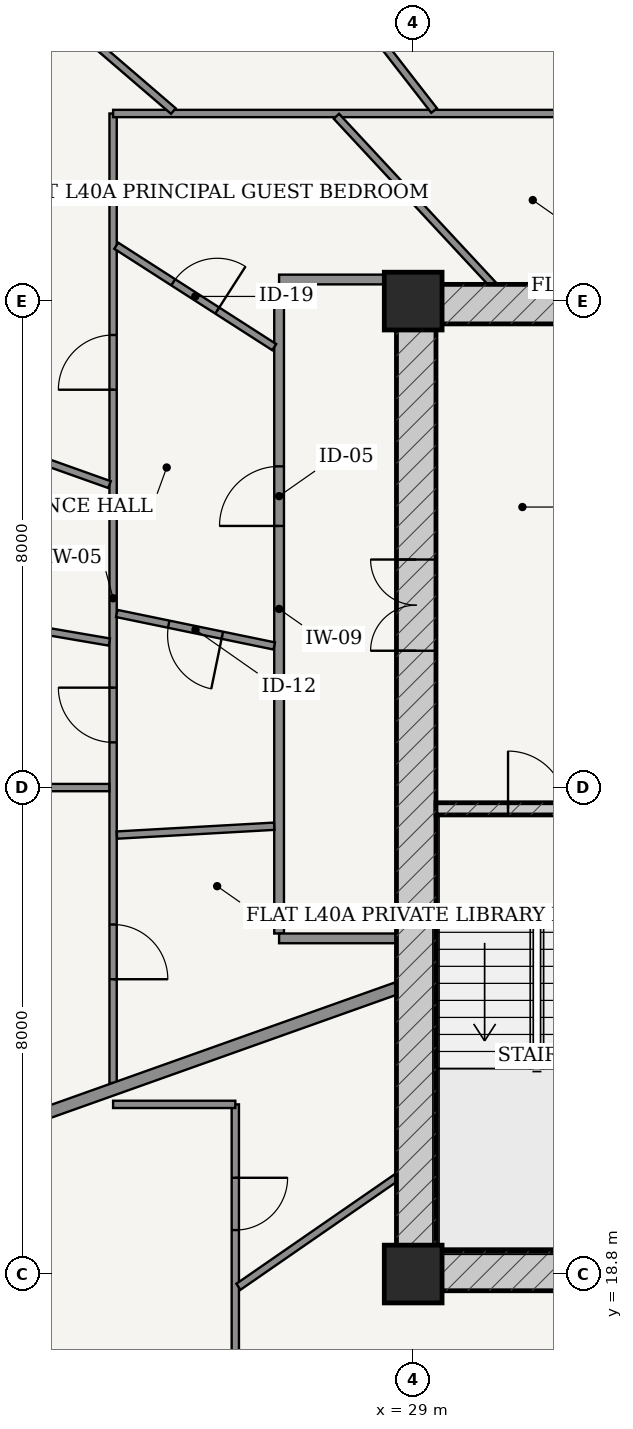
"""IFC4 building model, lengths in metres.
Left out: names, types, materials, properties, quantities, classifications, styles, units other than length and angle.
Written with IfcOpenShell. Run it as: python <this file> out.ifc"""

import sys

from ifc_helpers import new_model, si_unit, direction, frame, frame_2d, origin, origin_2d, place, context, subcontext, project, spatial, rectangle, extrude, source, transform, mapped, element, fill, save


model = new_model("IFC4")
c1 = context("Model", 3, precision=1e-05, world=origin(), true_north=direction((-0.2419218956, 0.970295726276)))
c2 = subcontext(c1, "Body", "Model", "MODEL_VIEW")
j1 = project(units=[si_unit("LENGTHUNIT", "METRE"), si_unit("PLANEANGLEUNIT", "RADIAN")], contexts=[c1])
p1 = place(None, origin())
s1 = spatial("IfcSite", under=j1, at=p1, CompositionType="ELEMENT")
p2 = place(p1, origin())
s2 = spatial("IfcBuilding", under=s1, at=p2, CompositionType="ELEMENT")
p3 = place(p2, frame((0.0, 0.0, 153.4)))
s3 = spatial("IfcBuildingStorey", under=s2, at=p3, CompositionType="ELEMENT", Elevation=153.4)
for number, where, z_axis, x_axis in (
    (1, (29.0, 18.8, 0.0), (0.0, 0.0, 1.0), (1.0, 0.0, 0.0)),
    (2, (29.0, 34.8, 0.0), (0.0, 0.0, 1.0), (1.0, 0.0, 0.0)),
):
    element("IfcColumn", number, at=place(p3, frame(where, z_axis=z_axis, x_axis=x_axis)), inside=s3, PredefinedType="COLUMN", context=c2, shape_type="SweptSolid", body=[
        extrude(rectangle(XDim=0.95, YDim=0.95, at=origin_2d()), origin(), (0.0, 0.0, 1.0), 3.6),
    ])
p4 = place(p3, frame((28.725, 18.85, 0.0), z_axis=(0.0, 0.0, 1.0), x_axis=(1.0, 0.0, 0.0)))
e3 = element("IfcWall", 3, at=p4, inside=s3, PredefinedType="SHEAR", context=c2, shape_type="SweptSolid", body=[
    extrude(rectangle(XDim=18.55, YDim=0.65, at=frame_2d((9.275, 0.0))), origin(), (0.0, 0.0, 1.0), 3.33),
])
p5 = place(p4, frame((7.51, 0.0, 0.0)))
e4 = element("IfcOpeningElement", 4, at=p5, cuts=e3, PredefinedType="OPENING", context=c2, shape_type="SweptSolid", body=[
    extrude(rectangle(XDim=0.85, YDim=2.1, at=frame_2d((0.425, 1.05))), frame((0.0, 0.335, 0.0), z_axis=(0.0, -1.0, 0.0), x_axis=(1.0, 0.0, 0.0)), (0.0, 0.0, 1.0), 0.67),
])
p6 = place(p4, frame((10.59, 0.0, 0.0)))
e5 = element("IfcOpeningElement", 5, at=p6, cuts=e3, PredefinedType="OPENING", context=c2, shape_type="SweptSolid", body=[
    extrude(rectangle(XDim=0.85, YDim=2.1, at=frame_2d((0.425, 1.05))), frame((0.0, 0.335, 0.0), z_axis=(0.0, -1.0, 0.0), x_axis=(1.0, 0.0, 0.0)), (0.0, 0.0, 1.0), 0.67),
])
p7 = place(p3, frame((28.725, 34.75, 0.0), z_axis=(0.0, 0.0, 1.0), x_axis=(1.0, 0.0, 0.0)))
e6 = element("IfcWall", 6, at=p7, inside=s3, PredefinedType="SHEAR", context=c2, shape_type="SweptSolid", body=[
    extrude(rectangle(XDim=18.55, YDim=0.65, at=frame_2d((9.275, 0.0))), origin(), (0.0, 0.0, 1.0), 3.33),
])
p8 = place(p3, frame((29.05, 19.175, 0.0), z_axis=(0.0, 0.0, 1.0), x_axis=(0.0, 1.0, 0.0)))
e7 = element("IfcWall", 7, at=p8, inside=s3, PredefinedType="SHEAR", context=c2, shape_type="SweptSolid", body=[
    extrude(rectangle(XDim=15.25, YDim=0.65, at=frame_2d((7.625, 0.0))), origin(), (0.0, 0.0, 1.0), 3.33),
])
p9 = place(p8, frame((9.875, 0.0, 0.0)))
e8 = element("IfcOpeningElement", 8, at=p9, cuts=e7, PredefinedType="OPENING", context=c2, shape_type="SweptSolid", body=[
    extrude(rectangle(XDim=1.5, YDim=2.2, at=frame_2d((0.75, 1.1))), frame((0.0, 0.335, 0.0), z_axis=(0.0, -1.0, 0.0), x_axis=(1.0, 0.0, 0.0)), (0.0, 0.0, 1.0), 0.67),
])
p10 = place(p3, frame((29.375, 26.45, 0.0), z_axis=(0.0, 0.0, 1.0), x_axis=(1.0, 0.0, 0.0)))
e9 = element("IfcWall", 9, at=p10, inside=s3, PredefinedType="SOLIDWALL", context=c2, shape_type="SweptSolid", body=[
    extrude(rectangle(XDim=3.32, YDim=0.2, at=frame_2d((1.66, 0.0))), origin(), (0.0, 0.0, 1.0), 3.33),
])
p11 = place(p10, frame((1.185, 0.0, 0.0)))
e10 = element("IfcOpeningElement", 10, at=p11, cuts=e9, PredefinedType="OPENING", context=c2, shape_type="SweptSolid", body=[
    extrude(rectangle(XDim=0.95, YDim=2.15, at=frame_2d((0.475, 1.075))), frame((0.0, 0.11, 0.0), z_axis=(0.0, -1.0, 0.0), x_axis=(1.0, 0.0, 0.0)), (0.0, 0.0, 1.0), 0.22),
])
p12 = place(p3, frame((26.795, 24.4, 0.0), z_axis=(0.0, 0.0, 1.0), x_axis=(0.0, 1.0, 0.0)))
e11 = element("IfcWall", 11, at=p12, inside=s3, PredefinedType="PARTITIONING", context=c2, shape_type="SweptSolid", body=[
    extrude(rectangle(XDim=10.675, YDim=0.16, at=frame_2d((5.337, 0.0))), origin(), (0.0, 0.0, 1.0), 2.776),
])
p13 = place(p12, frame((6.702, 0.0, 0.0)))
e12 = element("IfcOpeningElement", 12, at=p13, cuts=e11, PredefinedType="OPENING", context=c2, shape_type="SweptSolid", body=[
    extrude(rectangle(XDim=0.98, YDim=2.2, at=frame_2d((0.49, 1.1))), frame((0.0, 0.09, 0.0), z_axis=(0.0, -1.0, 0.0), x_axis=(1.0, 0.0, 0.0)), (0.0, 0.0, 1.0), 0.18),
])
p14 = place(p3, frame((26.795, 35.155, 0.0), z_axis=(0.0, 0.0, 1.0), x_axis=(1.0, 0.0, 0.0)))
e13 = element("IfcWall", 13, at=p14, inside=s3, PredefinedType="PARTITIONING", context=c2, shape_type="SweptSolid", body=[
    extrude(rectangle(XDim=1.93, YDim=0.16, at=frame_2d((0.965, 0.0))), origin(), (0.0, 0.0, 1.0), 2.776),
])
p15 = place(p3, frame((26.795, 24.32, 0.0), z_axis=(0.0, 0.0, 1.0), x_axis=(1.0, 0.0, 0.0)))
e14 = element("IfcWall", 14, at=p15, inside=s3, PredefinedType="PARTITIONING", context=c2, shape_type="SweptSolid", body=[
    extrude(rectangle(XDim=1.93, YDim=0.16, at=frame_2d((0.965, 0.0))), origin(), (0.0, 0.0, 1.0), 3.33),
])
p16 = place(p3, frame((24.065, 21.941, 0.0), z_axis=(0.0, 0.0, 1.0), x_axis=(0.0, 1.0, 0.0)))
e15 = element("IfcWall", 15, at=p16, inside=s3, PredefinedType="PARTITIONING", context=c2, shape_type="SweptSolid", body=[
    extrude(rectangle(XDim=15.944, YDim=0.12, at=frame_2d((7.972, 0.0))), origin(), (0.0, 0.0, 1.0), 2.776),
])
p17 = place(p16, frame((5.602, 0.0, 0.0)))
e16 = element("IfcOpeningElement", 16, at=p17, cuts=e15, PredefinedType="OPENING", context=c2, shape_type="SweptSolid", body=[
    extrude(rectangle(XDim=0.9, YDim=2.15, at=frame_2d((0.45, 1.075))), frame((0.0, 0.07, 0.0), z_axis=(0.0, -1.0, 0.0), x_axis=(1.0, 0.0, 0.0)), (0.0, 0.0, 1.0), 0.14),
])
p18 = place(p16, frame((1.707, 0.0, 0.0)))
e17 = element("IfcOpeningElement", 17, at=p18, cuts=e15, PredefinedType="OPENING", context=c2, shape_type="SweptSolid", body=[
    extrude(rectangle(XDim=0.9, YDim=2.15, at=frame_2d((0.45, 1.075))), frame((0.0, 0.07, 0.0), z_axis=(0.0, -1.0, 0.0), x_axis=(1.0, 0.0, 0.0)), (0.0, 0.0, 1.0), 0.14),
])
p19 = place(p16, frame((11.402, 0.0, 0.0)))
e18 = element("IfcOpeningElement", 18, at=p19, cuts=e15, PredefinedType="OPENING", context=c2, shape_type="SweptSolid", body=[
    extrude(rectangle(XDim=0.9, YDim=2.15, at=frame_2d((0.45, 1.075))), frame((0.0, 0.07, 0.0), z_axis=(0.0, -1.0, 0.0), x_axis=(1.0, 0.0, 0.0)), (0.0, 0.0, 1.0), 0.14),
])
p20 = place(p3, frame((24.065, 37.885, 0.0), z_axis=(0.0, 0.0, 1.0), x_axis=(1.0, 0.0, 0.0)))
e19 = element("IfcWall", 19, at=p20, inside=s3, PredefinedType="PARTITIONING", context=c2, shape_type="SweptSolid", body=[
    extrude(rectangle(XDim=7.47, YDim=0.12, at=frame_2d((3.735, 0.0))), origin(), (0.0, 0.0, 1.0), 2.776),
])
p21 = place(p3, frame((29.344, 37.934, 0.0), z_axis=(0.0, 0.0, 1.0), x_axis=(-0.613758289074, 0.789493991487, 0.0)))
e20 = element("IfcWall", 20, at=p21, inside=s3, PredefinedType="PARTITIONING", context=c2, shape_type="SweptSolid", body=[
    extrude(rectangle(XDim=7.695, YDim=0.12, at=frame_2d((3.848, 0.0))), origin(), (0.0, 0.0, 1.0), 2.776),
])
p22 = place(p21, frame((2.399, 0.0, 0.0)))
e21 = element("IfcOpeningElement", 21, at=p22, cuts=e20, PredefinedType="OPENING", context=c2, shape_type="SweptSolid", body=[
    extrude(rectangle(XDim=0.9, YDim=2.15, at=frame_2d((0.45, 1.075))), frame((0.0, 0.07, 0.0), z_axis=(0.0, -1.0, 0.0), x_axis=(1.0, 0.0, 0.0)), (0.0, 0.0, 1.0), 0.14),
])
p23 = place(p3, frame((25.056, 37.925, 0.0), z_axis=(0.0, 0.0, 1.0), x_axis=(-0.758354915574, 0.65184186888, 0.0)))
e22 = element("IfcWall", 22, at=p23, inside=s3, PredefinedType="PARTITIONING", context=c2, shape_type="SweptSolid", body=[
    extrude(rectangle(XDim=5.432, YDim=0.12, at=frame_2d((2.716, 0.0))), origin(), (0.0, 0.0, 1.0), 2.846),
])
p24 = place(p23, frame((2.266, 0.0, 0.0)))
e23 = element("IfcOpeningElement", 23, at=p24, cuts=e22, PredefinedType="OPENING", context=c2, shape_type="SweptSolid", body=[
    extrude(rectangle(XDim=0.9, YDim=2.15, at=frame_2d((0.45, 1.075))), frame((0.0, 0.07, 0.0), z_axis=(0.0, -1.0, 0.0), x_axis=(1.0, 0.0, 0.0)), (0.0, 0.0, 1.0), 0.14),
])
p25 = place(p3, frame((24.007, 31.782, 0.0), z_axis=(0.0, 0.0, 1.0), x_axis=(-0.942077868165, 0.335394231187, 0.0)))
e24 = element("IfcWall", 24, at=p25, inside=s3, PredefinedType="PARTITIONING", context=c2, shape_type="SweptSolid", body=[
    extrude(rectangle(XDim=8.817, YDim=0.12, at=frame_2d((4.408, 0.0))), origin(), (0.0, 0.0, 1.0), 2.846),
])
p26 = place(p25, frame((3.958, 0.0, 0.0)))
e25 = element("IfcOpeningElement", 25, at=p26, cuts=e24, PredefinedType="OPENING", context=c2, shape_type="SweptSolid", body=[
    extrude(rectangle(XDim=0.9, YDim=2.15, at=frame_2d((0.45, 1.075))), frame((0.0, 0.07, 0.0), z_axis=(0.0, -1.0, 0.0), x_axis=(1.0, 0.0, 0.0)), (0.0, 0.0, 1.0), 0.14),
])
p27 = place(p3, frame((24.004, 29.193, 0.0), z_axis=(0.0, 0.0, 1.0), x_axis=(-0.985698378271, 0.168519159369, 0.0)))
e26 = element("IfcWall", 26, at=p27, inside=s3, PredefinedType="PARTITIONING", context=c2, shape_type="SweptSolid", body=[
    extrude(rectangle(XDim=9.769, YDim=0.12, at=frame_2d((4.884, 0.0))), origin(), (0.0, 0.0, 1.0), 2.776),
])
p28 = place(p3, frame((24.003, 26.8, 0.0), z_axis=(0.0, 0.0, 1.0), x_axis=(-1.0, 0.0, 0.0)))
e27 = element("IfcWall", 27, at=p28, inside=s3, PredefinedType="PARTITIONING", context=c2, shape_type="SweptSolid", body=[
    extrude(rectangle(XDim=10.143, YDim=0.12, at=frame_2d((5.071, 0.0))), origin(), (0.0, 0.0, 1.0), 2.846),
])
p29 = place(p28, frame((4.622, 0.0, 0.0)))
e28 = element("IfcOpeningElement", 28, at=p29, cuts=e27, PredefinedType="OPENING", context=c2, shape_type="SweptSolid", body=[
    extrude(rectangle(XDim=0.9, YDim=2.15, at=frame_2d((0.45, 1.075))), frame((0.0, 0.07, 0.0), z_axis=(0.0, -1.0, 0.0), x_axis=(1.0, 0.0, 0.0)), (0.0, 0.0, 1.0), 0.14),
])
p30 = place(p3, frame((30.307, 35.075, 0.0), z_axis=(0.0, 0.0, 1.0), x_axis=(-0.68082810609, 0.732443233267, 0.0)))
e29 = element("IfcWall", 29, at=p30, inside=s3, PredefinedType="PARTITIONING", context=c2, shape_type="SweptSolid", body=[
    extrude(rectangle(XDim=3.775, YDim=0.12, at=frame_2d((1.887, 0.0))), origin(), (0.0, 0.0, 1.0), 2.776),
])
p31 = place(p3, frame((26.715, 34.043, 0.0), z_axis=(0.0, 0.0, 1.0), x_axis=(-0.841597086151, 0.540105864235, 0.0)))
e30 = element("IfcWall", 30, at=p31, inside=s3, PredefinedType="PARTITIONING", context=c2, shape_type="SweptSolid", body=[
    extrude(rectangle(XDim=3.087, YDim=0.12, at=frame_2d((1.543, 0.0))), origin(), (0.0, 0.0, 1.0), 3.005),
])
p32 = place(p31, frame((1.113, 0.0, 0.0)))
e31 = element("IfcOpeningElement", 31, at=p32, cuts=e30, PredefinedType="OPENING", context=c2, shape_type="SweptSolid", body=[
    extrude(rectangle(XDim=0.86, YDim=2.15, at=frame_2d((0.43, 1.075))), frame((0.0, 0.07, 0.0), z_axis=(0.0, -1.0, 0.0), x_axis=(1.0, 0.0, 0.0)), (0.0, 0.0, 1.0), 0.14),
])
p33 = place(p3, frame((26.715, 29.129, 0.0), z_axis=(0.0, 0.0, 1.0), x_axis=(-0.979376501526, 0.202043728582, 0.0)))
e32 = element("IfcWall", 32, at=p33, inside=s3, PredefinedType="PARTITIONING", context=c2, shape_type="SweptSolid", body=[
    extrude(rectangle(XDim=2.644, YDim=0.12, at=frame_2d((1.322, 0.0))), origin(), (0.0, 0.0, 1.0), 3.33),
])
p34 = place(p33, frame((0.872, 0.0, 0.0)))
e33 = element("IfcOpeningElement", 33, at=p34, cuts=e32, PredefinedType="OPENING", context=c2, shape_type="SweptSolid", body=[
    extrude(rectangle(XDim=0.9, YDim=2.15, at=frame_2d((0.45, 1.075))), frame((0.0, 0.07, 0.0), z_axis=(0.0, -1.0, 0.0), x_axis=(1.0, 0.0, 0.0)), (0.0, 0.0, 1.0), 0.14),
])
p35 = place(p3, frame((26.715, 26.164, 0.0), z_axis=(0.0, 0.0, 1.0), x_axis=(-0.998418047295, -0.056226353574, 0.0)))
e34 = element("IfcWall", 34, at=p35, inside=s3, PredefinedType="PARTITIONING", context=c2, shape_type="SweptSolid", body=[
    extrude(rectangle(XDim=2.592, YDim=0.12, at=frame_2d((1.296, 0.0))), origin(), (0.0, 0.0, 1.0), 3.33),
])
p36 = place(p3, frame((28.723, 23.497, 0.0), z_axis=(0.0, 0.0, 1.0), x_axis=(-0.942077095572, -0.335396401292, 0.0)))
e35 = element("IfcWall", 35, at=p36, inside=s3, PredefinedType="PARTITIONING", context=c2, shape_type="SweptSolid", body=[
    extrude(rectangle(XDim=13.823, YDim=0.2, at=frame_2d((6.912, 0.0))), origin(), (0.0, 0.0, 1.0), 2.846),
])
p37 = place(p3, frame((26.075, 15.875, 0.0), z_axis=(0.0, 0.0, 1.0), x_axis=(0.0, 1.0, 0.0)))
e36 = element("IfcWall", 36, at=p37, inside=s3, PredefinedType="PARTITIONING", context=c2, shape_type="SweptSolid", body=[
    extrude(rectangle(XDim=5.715, YDim=0.12, at=frame_2d((2.857, 0.0))), origin(), (0.0, 0.0, 1.0), 2.776),
])
p38 = place(p37, frame((3.648, 0.0, 0.0)))
e37 = element("IfcOpeningElement", 37, at=p38, cuts=e36, PredefinedType="OPENING", context=c2, shape_type="SweptSolid", body=[
    extrude(rectangle(XDim=0.86, YDim=2.15, at=frame_2d((0.43, 1.075))), frame((0.0, 0.07, 0.0), z_axis=(0.0, -1.0, 0.0), x_axis=(1.0, 0.0, 0.0)), (0.0, 0.0, 1.0), 0.14),
])
p39 = place(p3, frame((26.075, 21.59, 0.0), z_axis=(0.0, 0.0, 1.0), x_axis=(-1.0, 0.0, 0.0)))
e38 = element("IfcWall", 38, at=p39, inside=s3, PredefinedType="PARTITIONING", context=c2, shape_type="SweptSolid", body=[
    extrude(rectangle(XDim=2.01, YDim=0.12, at=frame_2d((1.005, 0.0))), origin(), (0.0, 0.0, 1.0), 3.33),
])
p40 = place(p3, frame((28.723, 20.386, 0.0), z_axis=(0.0, 0.0, 1.0), x_axis=(-0.822570551556, -0.568663070467, 0.0)))
e39 = element("IfcWall", 39, at=p40, inside=s3, PredefinedType="PARTITIONING", context=c2, shape_type="SweptSolid", body=[
    extrude(rectangle(XDim=3.158, YDim=0.12, at=frame_2d((1.579, 0.0))), origin(), (0.0, 0.0, 1.0), 3.33),
])
p41 = place(p3, frame((32.691, 18.525, 0.0), z_axis=(0.0, 0.0, 1.0), x_axis=(-0.54002976428, -0.841645919429, 0.0)))
e40 = element("IfcWall", 40, at=p41, inside=s3, PredefinedType="PARTITIONING", context=c2, shape_type="SweptSolid", body=[
    extrude(rectangle(XDim=3.086, YDim=0.12, at=frame_2d((1.543, 0.0))), origin(), (0.0, 0.0, 1.0), 3.33),
])
m1 = source(origin(), c2, "Body", "SweptSolid", [
    extrude(rectangle(XDim=1.5, YDim=2.2, at=frame_2d((0.75, 1.1))), frame((0.0, 0.025, 0.0), z_axis=(0.0, -1.0, 0.0), x_axis=(1.0, 0.0, 0.0)), (0.0, 0.0, 1.0), 0.05),
])
p42 = place(p9, origin())
e41 = element("IfcDoor", 41, at=p42, inside=s3, OperationType="DOUBLE_DOOR_SINGLE_SWING", PredefinedType="DOOR", context=c2, shape_type="MappedRepresentation", body=[
    mapped(m1, transform((0.0, 0.0, 0.0), scale=1.0)),
])
fill(e8, e41)
m2 = source(origin(), c2, "Body", "SweptSolid", [
    extrude(rectangle(XDim=0.95, YDim=2.15, at=frame_2d((0.475, 1.075))), frame((0.0, 0.025, 0.0), z_axis=(0.0, -1.0, 0.0), x_axis=(1.0, 0.0, 0.0)), (0.0, 0.0, 1.0), 0.05),
])
p43 = place(p11, origin())
e42 = element("IfcDoor", 42, at=p43, inside=s3, OperationType="SINGLE_SWING_LEFT", PredefinedType="DOOR", context=c2, shape_type="MappedRepresentation", body=[
    mapped(m2, transform((0.0, 0.0, 0.0), scale=1.0)),
])
fill(e10, e42)
m3 = source(origin(), c2, "Body", "SweptSolid", [
    extrude(rectangle(XDim=0.98, YDim=2.2, at=frame_2d((0.49, 1.1))), frame((0.0, 0.025, 0.0), z_axis=(0.0, -1.0, 0.0), x_axis=(1.0, 0.0, 0.0)), (0.0, 0.0, 1.0), 0.05),
])
p44 = place(p13, origin())
e43 = element("IfcDoor", 43, at=p44, inside=s3, OperationType="SINGLE_SWING_LEFT", PredefinedType="DOOR", context=c2, shape_type="MappedRepresentation", body=[
    mapped(m3, transform((0.0, 0.0, 0.0), scale=1.0)),
])
fill(e12, e43)
m4 = source(origin(), c2, "Body", "SweptSolid", [
    extrude(rectangle(XDim=0.86, YDim=2.15, at=frame_2d((0.43, 1.075))), frame((0.0, 0.025, 0.0), z_axis=(0.0, -1.0, 0.0), x_axis=(1.0, 0.0, 0.0)), (0.0, 0.0, 1.0), 0.05),
])
p45 = place(p32, frame((0.86, 0.0, 0.0), z_axis=(0.0, 0.0, 1.0), x_axis=(-1.0, 0.0, 0.0)))
e44 = element("IfcDoor", 44, at=p45, inside=s3, OperationType="SINGLE_SWING_RIGHT", PredefinedType="DOOR", context=c2, shape_type="MappedRepresentation", body=[
    mapped(m4, transform((0.0, 0.0, 0.0), scale=1.0)),
])
fill(e31, e44)
m5 = source(origin(), c2, "Body", "SweptSolid", [
    extrude(rectangle(XDim=0.9, YDim=2.15, at=frame_2d((0.45, 1.075))), frame((0.0, 0.025, 0.0), z_axis=(0.0, -1.0, 0.0), x_axis=(1.0, 0.0, 0.0)), (0.0, 0.0, 1.0), 0.05),
])
p46 = place(p34, origin())
e45 = element("IfcDoor", 45, at=p46, inside=s3, OperationType="SINGLE_SWING_LEFT", PredefinedType="DOOR", context=c2, shape_type="MappedRepresentation", body=[
    mapped(m5, transform((0.0, 0.0, 0.0), scale=1.0)),
])
fill(e33, e45)
p47 = place(p17, origin())
e46 = element("IfcDoor", 46, at=p47, inside=s3, OperationType="SINGLE_SWING_RIGHT", PredefinedType="DOOR", context=c2, shape_type="MappedRepresentation", body=[
    mapped(m5, transform((0.0, 0.0, 0.0), scale=1.0)),
])
fill(e16, e46)
p48 = place(p18, frame((0.9, 0.0, 0.0), z_axis=(0.0, 0.0, 1.0), x_axis=(-1.0, 0.0, 0.0)))
e47 = element("IfcDoor", 47, at=p48, inside=s3, OperationType="SINGLE_SWING_RIGHT", PredefinedType="DOOR", context=c2, shape_type="MappedRepresentation", body=[
    mapped(m5, transform((0.0, 0.0, 0.0), scale=1.0)),
])
fill(e17, e47)
p49 = place(p19, origin())
e48 = element("IfcDoor", 48, at=p49, inside=s3, OperationType="SINGLE_SWING_LEFT", PredefinedType="DOOR", context=c2, shape_type="MappedRepresentation", body=[
    mapped(m5, transform((0.0, 0.0, 0.0), scale=1.0)),
])
fill(e18, e48)
p50 = place(p38, frame((0.86, 0.0, 0.0), z_axis=(0.0, 0.0, 1.0), x_axis=(-1.0, 0.0, 0.0)))
e49 = element("IfcDoor", 49, at=p50, inside=s3, OperationType="SINGLE_SWING_LEFT", PredefinedType="DOOR", context=c2, shape_type="MappedRepresentation", body=[
    mapped(m4, transform((0.0, 0.0, 0.0), scale=1.0)),
])
fill(e37, e49)
save(model, sys.argv[1])
